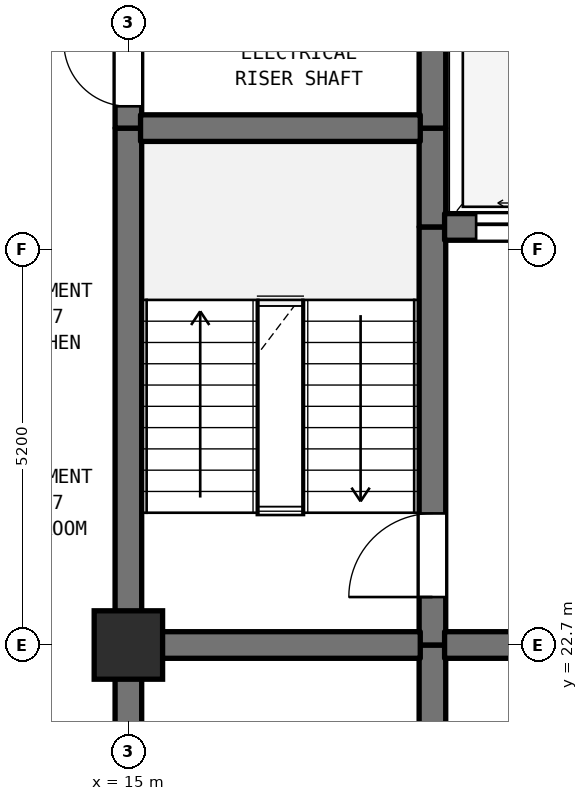
"""IFC4 building model, lengths in metres.
Left out: names, types, materials, properties, quantities, classifications, styles, units other than length and angle.
Written with IfcOpenShell. Run it as: python <this file> out.ifc"""

import sys

from ifc_helpers import new_model, si_unit, direction, frame, frame_2d, origin, origin_2d, place, context, subcontext, project, spatial, rectangle, extrude, element, fill, save


model = new_model("IFC4")
c1 = context("Model", 3, precision=1e-05, world=origin(), true_north=direction((0.0, 1.0)))
c2 = subcontext(c1, "Body", "Model", "MODEL_VIEW")
j1 = project(units=[si_unit("LENGTHUNIT", "METRE"), si_unit("PLANEANGLEUNIT", "RADIAN")], contexts=[c1])
p1 = place(None, origin())
s1 = spatial("IfcSite", under=j1, at=p1, CompositionType="ELEMENT")
p2 = place(p1, origin())
s2 = spatial("IfcBuilding", under=s1, at=p2, CompositionType="ELEMENT")
p3 = place(p2, frame((0.0, 0.0, 137.2)))
s3 = spatial("IfcBuildingStorey", under=s2, at=p3, CompositionType="ELEMENT", Elevation=137.2)
p4 = place(p3, frame((15.0, 22.7, 0.0), z_axis=(0.0, 0.0, 1.0), x_axis=(1.0, 0.0, 0.0)))
e1 = element("IfcColumn", 1, at=p4, inside=s3, PredefinedType="COLUMN", context=c2, shape_type="SweptSolid", body=[
    extrude(rectangle(XDim=0.9, YDim=0.9, at=origin_2d()), origin(), (0.0, 0.0, 1.0), 3.7),
])
p5 = place(p3, frame((15.0, 19.5, 0.0), z_axis=(0.0, 0.0, 1.0), x_axis=(0.0, 1.0, 0.0)))
e2 = element("IfcWall", 2, at=p5, inside=s3, PredefinedType="SHEAR", context=c2, shape_type="SweptSolid", body=[
    extrude(rectangle(XDim=3.2, YDim=0.35, at=frame_2d((1.6, 0.0))), origin(), (0.0, 0.0, 1.0), 3.385),
])
p6 = place(p3, frame((15.0, 22.7, 0.0), z_axis=(0.0, 0.0, 1.0), x_axis=(0.0, 1.0, 0.0)))
e3 = element("IfcWall", 3, at=p6, inside=s3, PredefinedType="SHEAR", context=c2, shape_type="SweptSolid", body=[
    extrude(rectangle(XDim=6.8, YDim=0.35, at=frame_2d((3.4, 0.0))), origin(), (0.0, 0.0, 1.0), 3.385),
])
p7 = place(p3, frame((15.0, 29.5, 0.0), z_axis=(0.0, 0.0, 1.0), x_axis=(0.0, 1.0, 0.0)))
e4 = element("IfcWall", 4, at=p7, inside=s3, PredefinedType="SHEAR", context=c2, shape_type="SweptSolid", body=[
    extrude(rectangle(XDim=1.6, YDim=0.35, at=frame_2d((0.8, 0.0))), origin(), (0.0, 0.0, 1.0), 3.385),
])
p8 = place(p7, frame((0.287, 0.0, 0.0)))
e5 = element("IfcOpeningElement", 5, at=p8, cuts=e4, PredefinedType="OPENING", context=c2, shape_type="SweptSolid", body=[
    extrude(rectangle(XDim=0.85, YDim=2.1, at=frame_2d((0.425, 1.05))), frame((0.0, 0.185, 0.0), z_axis=(0.0, -1.0, 0.0), x_axis=(1.0, 0.0, 0.0)), (0.0, 0.0, 1.0), 0.37),
])
p9 = place(p3, frame((19.0, 19.5, 0.0), z_axis=(0.0, 0.0, 1.0), x_axis=(0.0, 1.0, 0.0)))
e6 = element("IfcWall", 6, at=p9, inside=s3, PredefinedType="SHEAR", context=c2, shape_type="SweptSolid", body=[
    extrude(rectangle(XDim=3.2, YDim=0.35, at=frame_2d((1.6, 0.0))), origin(), (0.0, 0.0, 1.0), 3.385),
])
p10 = place(p3, frame((19.0, 22.7, 0.0), z_axis=(0.0, 0.0, 1.0), x_axis=(0.0, 1.0, 0.0)))
e7 = element("IfcWall", 7, at=p10, inside=s3, PredefinedType="SHEAR", context=c2, shape_type="SweptSolid", body=[
    extrude(rectangle(XDim=5.5, YDim=0.35, at=frame_2d((2.75, 0.0))), origin(), (0.0, 0.0, 1.0), 3.385),
])
p11 = place(p10, frame((0.631, 0.0, 0.0)))
e8 = element("IfcOpeningElement", 8, at=p11, cuts=e7, PredefinedType="OPENING", context=c2, shape_type="SweptSolid", body=[
    extrude(rectangle(XDim=1.1, YDim=2.15, at=frame_2d((0.55, 1.075))), frame((0.0, 0.185, 0.0), z_axis=(0.0, -1.0, 0.0), x_axis=(1.0, 0.0, 0.0)), (0.0, 0.0, 1.0), 0.37),
])
p12 = place(p3, frame((19.0, 28.2, 0.0), z_axis=(0.0, 0.0, 1.0), x_axis=(0.0, 1.0, 0.0)))
e9 = element("IfcWall", 9, at=p12, inside=s3, PredefinedType="SHEAR", context=c2, shape_type="SweptSolid", body=[
    extrude(rectangle(XDim=1.3, YDim=0.35, at=frame_2d((0.65, 0.0))), origin(), (0.0, 0.0, 1.0), 3.385),
])
p13 = place(p3, frame((19.0, 29.5, 0.0), z_axis=(0.0, 0.0, 1.0), x_axis=(0.0, 1.0, 0.0)))
e10 = element("IfcWall", 10, at=p13, inside=s3, PredefinedType="SHEAR", context=c2, shape_type="SweptSolid", body=[
    extrude(rectangle(XDim=5.5, YDim=0.35, at=frame_2d((2.75, 0.0))), origin(), (0.0, 0.0, 1.0), 3.385),
])
p14 = place(p13, frame((2.025, 0.0, 0.0)))
e11 = element("IfcOpeningElement", 11, at=p14, cuts=e10, PredefinedType="OPENING", context=c2, shape_type="SweptSolid", body=[
    extrude(rectangle(XDim=1.1, YDim=2.15, at=frame_2d((0.55, 1.075))), frame((0.0, 0.185, 0.0), z_axis=(0.0, -1.0, 0.0), x_axis=(1.0, 0.0, 0.0)), (0.0, 0.0, 1.0), 0.37),
])
p15 = place(p3, frame((15.16, 22.7, 0.0), z_axis=(0.0, 0.0, 1.0), x_axis=(1.0, 0.0, 0.0)))
e12 = element("IfcWall", 12, at=p15, inside=s3, PredefinedType="SHEAR", context=c2, shape_type="SweptSolid", body=[
    extrude(rectangle(XDim=3.68, YDim=0.35, at=frame_2d((1.84, 0.0))), origin(), (0.0, 0.0, 1.0), 3.385),
])
p16 = place(p3, frame((19.16, 22.7, 0.0), z_axis=(0.0, 0.0, 1.0), x_axis=(1.0, 0.0, 0.0)))
e13 = element("IfcWall", 13, at=p16, inside=s3, PredefinedType="SHEAR", context=c2, shape_type="SweptSolid", body=[
    extrude(rectangle(XDim=4.48, YDim=0.35, at=frame_2d((2.24, 0.0))), origin(), (0.0, 0.0, 1.0), 3.385),
])
p17 = place(p16, frame((1.64, 0.0, 0.0)))
e14 = element("IfcOpeningElement", 14, at=p17, cuts=e13, PredefinedType="OPENING", context=c2, shape_type="SweptSolid", body=[
    extrude(rectangle(XDim=1.2, YDim=2.2, at=frame_2d((0.6, 1.1))), frame((0.0, 0.185, 0.0), z_axis=(0.0, -1.0, 0.0), x_axis=(1.0, 0.0, 0.0)), (0.0, 0.0, 1.0), 0.37),
])
p18 = place(p3, frame((19.16, 28.2, 0.0), z_axis=(0.0, 0.0, 1.0), x_axis=(1.0, 0.0, 0.0)))
e15 = element("IfcWall", 15, at=p18, inside=s3, PredefinedType="SHEAR", context=c2, shape_type="SweptSolid", body=[
    extrude(rectangle(XDim=4.48, YDim=0.35, at=frame_2d((2.24, 0.0))), origin(), (0.0, 0.0, 1.0), 3.385),
])
p19 = place(p18, frame((0.415, 0.0, 0.0)))
e16 = element("IfcOpeningElement", 16, at=p19, cuts=e15, PredefinedType="OPENING", context=c2, shape_type="SweptSolid", body=[
    extrude(rectangle(XDim=1.25, YDim=2.2, at=frame_2d((0.625, 1.1))), frame((0.0, 0.185, 0.0), z_axis=(0.0, -1.0, 0.0), x_axis=(1.0, 0.0, 0.0)), (0.0, 0.0, 1.0), 0.37),
])
p20 = place(p18, frame((2.815, 0.0, 0.0)))
e17 = element("IfcOpeningElement", 17, at=p20, cuts=e15, PredefinedType="OPENING", context=c2, shape_type="SweptSolid", body=[
    extrude(rectangle(XDim=1.25, YDim=2.2, at=frame_2d((0.625, 1.1))), frame((0.0, 0.185, 0.0), z_axis=(0.0, -1.0, 0.0), x_axis=(1.0, 0.0, 0.0)), (0.0, 0.0, 1.0), 0.37),
])
p21 = place(p3, frame((15.16, 29.5, 0.0), z_axis=(0.0, 0.0, 1.0), x_axis=(1.0, 0.0, 0.0)))
e18 = element("IfcWall", 18, at=p21, inside=s3, PredefinedType="SHEAR", context=c2, shape_type="SweptSolid", body=[
    extrude(rectangle(XDim=3.68, YDim=0.35, at=frame_2d((1.84, 0.0))), origin(), (0.0, 0.0, 1.0), 3.385),
])
p22 = place(p8, origin())
e19 = element("IfcDoor", 19, at=p22, inside=s3, OperationType="SINGLE_SWING_RIGHT", PredefinedType="DOOR", context=c2, shape_type="SweptSolid", body=[
    extrude(rectangle(XDim=0.85, YDim=2.1, at=frame_2d((0.425, 1.05))), frame((0.0, 0.025, 0.0), z_axis=(0.0, -1.0, 0.0), x_axis=(1.0, 0.0, 0.0)), (0.0, 0.0, 1.0), 0.05),
])
fill(e5, e19)
p23 = place(p11, origin())
e20 = element("IfcDoor", 20, at=p23, inside=s3, OperationType="SINGLE_SWING_LEFT", PredefinedType="DOOR", context=c2, shape_type="SweptSolid", body=[
    extrude(rectangle(XDim=1.1, YDim=2.15, at=frame_2d((0.55, 1.075))), frame((0.0, 0.025, 0.0), z_axis=(0.0, -1.0, 0.0), x_axis=(1.0, 0.0, 0.0)), (0.0, 0.0, 1.0), 0.05),
])
fill(e8, e20)
p24 = place(p19, origin())
e21 = element("IfcDoor", 21, at=p24, inside=s3, OperationType="DOUBLE_DOOR_SLIDING", PredefinedType="DOOR", context=c2, shape_type="SweptSolid", body=[
    extrude(rectangle(XDim=1.25, YDim=2.2, at=frame_2d((0.625, 1.1))), frame((0.0, 0.025, 0.0), z_axis=(0.0, -1.0, 0.0), x_axis=(1.0, 0.0, 0.0)), (0.0, 0.0, 1.0), 0.05),
])
fill(e16, e21)
save(model, sys.argv[1])
